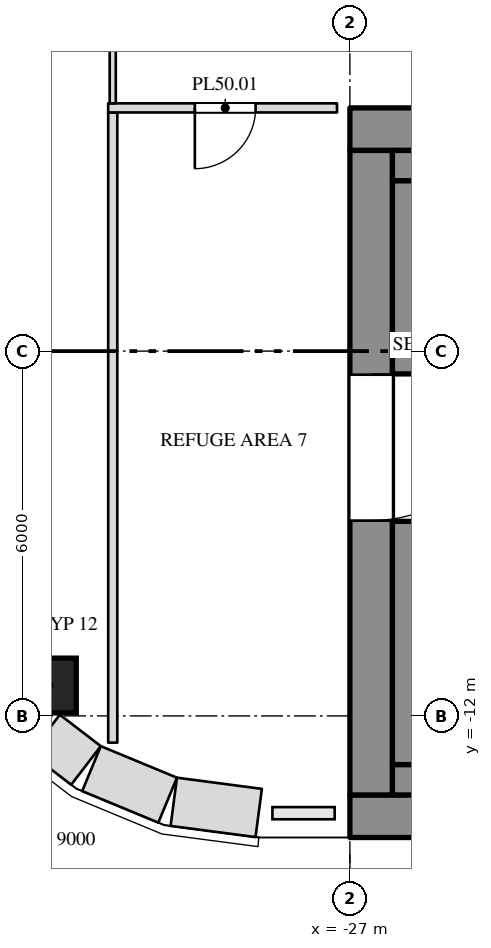
"""IFC4 building model, lengths in metres.
Left out: names, types, materials, properties, quantities, classifications, styles, units other than length and angle.
Written with IfcOpenShell. Run it as: python <this file> out.ifc"""

import sys

from ifc_helpers import new_model, si_unit, direction, frame, frame_2d, origin, origin_2d, place, context, subcontext, project, spatial, rectangle, extrude, element, fill, save


model = new_model("IFC4")
c1 = context("Model", 3, precision=1e-05, world=origin(), true_north=direction((0.0, 1.0)))
c2 = subcontext(c1, "Body", "Model", "MODEL_VIEW")
j1 = project(units=[si_unit("LENGTHUNIT", "METRE"), si_unit("PLANEANGLEUNIT", "RADIAN")], contexts=[c1])
p1 = place(None, origin())
s1 = spatial("IfcSite", under=j1, at=p1, CompositionType="ELEMENT")
p2 = place(p1, origin())
s2 = spatial("IfcBuilding", under=s1, at=p2, CompositionType="ELEMENT")
p3 = place(p2, frame((0.0, 0.0, 216.5)))
s3 = spatial("IfcBuildingStorey", under=s2, at=p3, CompositionType="ELEMENT", Elevation=216.5)
p4 = place(p3, frame((-31.95, -11.5, 0.0), z_axis=(0.0, 0.0, 1.0), x_axis=(1.0, 0.0, 0.0)))
e1 = element("IfcColumn", 1, at=p4, inside=s3, PredefinedType="COLUMN", context=c2, shape_type="SweptSolid", body=[
    extrude(rectangle(XDim=0.9, YDim=0.9, at=origin_2d()), origin(), (0.0, 0.0, 1.0), 4.0),
])
p5 = place(p3, frame((-27.0, -2.35, 0.0), z_axis=(0.0, 0.0, 1.0), x_axis=(1.0, 0.0, 0.0)))
e2 = element("IfcWall", 2, at=p5, inside=s3, PredefinedType="SHEAR", context=c2, shape_type="SweptSolid", body=[
    extrude(rectangle(XDim=54.0, YDim=0.7, at=frame_2d((27.0, 0.0))), origin(), (0.0, 0.0, 1.0), 3.8),
])
p6 = place(p5, frame((15.15, 0.0, 0.0)))
e3 = element("IfcOpeningElement", 3, at=p6, cuts=e2, PredefinedType="OPENING", context=c2, shape_type="SweptSolid", body=[
    extrude(rectangle(XDim=2.4, YDim=2.1, at=frame_2d((1.2, 1.05))), frame((0.0, 0.362, 0.0), z_axis=(0.0, -1.0, 0.0), x_axis=(1.0, 0.0, 0.0)), (0.0, 0.0, 1.0), 0.724),
])
p7 = place(p5, frame((36.45, 0.0, 0.0)))
e4 = element("IfcOpeningElement", 4, at=p7, cuts=e2, PredefinedType="OPENING", context=c2, shape_type="SweptSolid", body=[
    extrude(rectangle(XDim=2.4, YDim=2.1, at=frame_2d((1.2, 1.05))), frame((0.0, 0.362, 0.0), z_axis=(0.0, -1.0, 0.0), x_axis=(1.0, 0.0, 0.0)), (0.0, 0.0, 1.0), 0.724),
])
p8 = place(p3, frame((-27.0, -13.65, 0.0), z_axis=(0.0, 0.0, 1.0), x_axis=(1.0, 0.0, 0.0)))
e5 = element("IfcWall", 5, at=p8, inside=s3, PredefinedType="SHEAR", context=c2, shape_type="SweptSolid", body=[
    extrude(rectangle(XDim=54.0, YDim=0.7, at=frame_2d((27.0, 0.0))), origin(), (0.0, 0.0, 1.0), 3.8),
])
p9 = place(p3, frame((-26.65, -13.3, 0.0), z_axis=(0.0, 0.0, 1.0), x_axis=(0.0, 1.0, 0.0)))
e6 = element("IfcWall", 6, at=p9, inside=s3, PredefinedType="SHEAR", context=c2, shape_type="SweptSolid", body=[
    extrude(rectangle(XDim=10.6, YDim=0.7, at=frame_2d((5.3, 0.0))), origin(), (0.0, 0.0, 1.0), 3.8),
])
p10 = place(p9, frame((4.512, 0.0, 0.0)))
e7 = element("IfcOpeningElement", 7, at=p10, cuts=e6, PredefinedType="OPENING", context=c2, shape_type="SweptSolid", body=[
    extrude(rectangle(XDim=2.4, YDim=2.1, at=frame_2d((1.2, 1.05))), frame((0.0, 0.362, 0.0), z_axis=(0.0, -1.0, 0.0), x_axis=(1.0, 0.0, 0.0)), (0.0, 0.0, 1.0), 0.724),
])
p11 = place(p3, frame((-26.3, -2.95, 0.0), z_axis=(0.0, 0.0, 1.0), x_axis=(1.0, 0.0, 0.0)))
e8 = element("IfcWall", 8, at=p11, inside=s3, PredefinedType="SHEAR", context=c2, shape_type="SweptSolid", body=[
    extrude(rectangle(XDim=14.3, YDim=0.5, at=frame_2d((7.15, 0.0))), origin(), (0.0, 0.0, 1.0), 3.8),
])
p12 = place(p3, frame((-26.3, -13.05, 0.0), z_axis=(0.0, 0.0, 1.0), x_axis=(1.0, 0.0, 0.0)))
e9 = element("IfcWall", 9, at=p12, inside=s3, PredefinedType="SHEAR", context=c2, shape_type="SweptSolid", body=[
    extrude(rectangle(XDim=52.6, YDim=0.5, at=frame_2d((26.3, 0.0))), origin(), (0.0, 0.0, 1.0), 3.8),
])
p13 = place(p3, frame((-26.05, -12.8, 0.0), z_axis=(0.0, 0.0, 1.0), x_axis=(0.0, 1.0, 0.0)))
e10 = element("IfcWall", 10, at=p13, inside=s3, PredefinedType="SHEAR", context=c2, shape_type="SweptSolid", body=[
    extrude(rectangle(XDim=4.0, YDim=0.5, at=frame_2d((2.0, 0.0))), origin(), (0.0, 0.0, 1.0), 3.8),
])
p14 = place(p3, frame((-26.05, -6.375, 0.0), z_axis=(0.0, 0.0, 1.0), x_axis=(0.0, 1.0, 0.0)))
e11 = element("IfcWall", 11, at=p14, inside=s3, PredefinedType="SHEAR", context=c2, shape_type="SweptSolid", body=[
    extrude(rectangle(XDim=3.175, YDim=0.5, at=frame_2d((1.587, 0.0))), origin(), (0.0, 0.0, 1.0), 3.8),
])
p15 = place(p3, frame((-30.9, -12.44, 0.0), z_axis=(0.0, 0.0, 1.0), x_axis=(0.0, 1.0, 0.0)))
e12 = element("IfcWall", 12, at=p15, inside=s3, PredefinedType="PARTITIONING", context=c2, shape_type="SweptSolid", body=[
    extrude(rectangle(XDim=10.365, YDim=0.15, at=frame_2d((5.183, 0.0))), origin(), (0.0, 0.0, 1.0), 3.8),
])
p16 = place(p3, frame((-30.975, -2.0, 0.0), z_axis=(0.0, 0.0, 1.0), x_axis=(1.0, 0.0, 0.0)))
e13 = element("IfcWall", 13, at=p16, inside=s3, PredefinedType="PARTITIONING", context=c2, shape_type="SweptSolid", body=[
    extrude(rectangle(XDim=3.763, YDim=0.15, at=frame_2d((1.882, 0.0))), origin(), (0.0, 0.0, 1.0), 3.8),
])
p17 = place(p16, frame((1.425, 0.0, 0.0)))
e14 = element("IfcOpeningElement", 14, at=p17, cuts=e13, PredefinedType="OPENING", context=c2, shape_type="SweptSolid", body=[
    extrude(rectangle(XDim=1.0, YDim=2.1, at=frame_2d((0.5, 1.05))), frame((0.0, 0.087, 0.0), z_axis=(0.0, -1.0, 0.0), x_axis=(1.0, 0.0, 0.0)), (0.0, 0.0, 1.0), 0.174),
])
p18 = place(p3, frame((-30.9, -1.925, 0.0), z_axis=(0.0, 0.0, 1.0), x_axis=(0.0, 1.0, 0.0)))
e15 = element("IfcWall", 15, at=p18, inside=s3, PredefinedType="PARTITIONING", context=c2, shape_type="SweptSolid", body=[
    extrude(rectangle(XDim=2.25, YDim=0.1, at=frame_2d((1.125, 0.0))), origin(), (0.0, 0.0, 1.0), 3.8),
])
p19 = place(p3, frame((-32.014, -12.298, 0.0), z_axis=(0.0, 0.0, 1.0), x_axis=(0.793361000707, -0.608751445631, 0.0)))
e16 = element("IfcWall", 16, at=p19, inside=s3, PredefinedType="SOLIDWALL", context=c2, shape_type="SweptSolid", body=[
    extrude(rectangle(XDim=0.849, YDim=0.8, at=frame_2d((0.425, 0.0))), origin(), (0.0, 0.0, 1.0), 3.8),
])
p20 = place(p3, frame((-31.25, -12.867, 0.0), z_axis=(0.0, 0.0, 1.0), x_axis=(0.923847774587, -0.38276009378, 0.0)))
e17 = element("IfcWall", 17, at=p20, inside=s3, PredefinedType="SOLIDWALL", context=c2, shape_type="SweptSolid", body=[
    extrude(rectangle(XDim=1.355, YDim=0.8, at=frame_2d((0.678, 0.0))), origin(), (0.0, 0.0, 1.0), 3.8),
])
p21 = place(p3, frame((-29.896, -13.413, 0.0), z_axis=(0.0, 0.0, 1.0), x_axis=(0.99144603414, -0.130517283865, 0.0)))
e18 = element("IfcWall", 18, at=p21, inside=s3, PredefinedType="SOLIDWALL", context=c2, shape_type="SweptSolid", body=[
    extrude(rectangle(XDim=1.408, YDim=0.8, at=frame_2d((0.704, 0.0))), origin(), (0.0, 0.0, 1.0), 3.8),
])
p22 = place(p17, origin())
e19 = element("IfcDoor", 19, at=p22, inside=s3, OperationType="SINGLE_SWING_RIGHT", PredefinedType="DOOR", context=c2, shape_type="SweptSolid", body=[
    extrude(rectangle(XDim=1.0, YDim=2.1, at=frame_2d((0.5, 1.05))), frame((0.0, 0.025, 0.0), z_axis=(0.0, -1.0, 0.0), x_axis=(1.0, 0.0, 0.0)), (0.0, 0.0, 1.0), 0.05),
])
fill(e14, e19)
p23 = place(p10, origin())
e20 = element("IfcDoor", 20, at=p23, inside=s3, OperationType="DOUBLE_DOOR_SINGLE_SWING", PredefinedType="DOOR", context=c2, shape_type="SweptSolid", body=[
    extrude(rectangle(XDim=2.4, YDim=2.1, at=frame_2d((1.2, 1.05))), frame((0.0, 0.025, 0.0), z_axis=(0.0, -1.0, 0.0), x_axis=(1.0, 0.0, 0.0)), (0.0, 0.0, 1.0), 0.05),
])
fill(e7, e20)
save(model, sys.argv[1])
